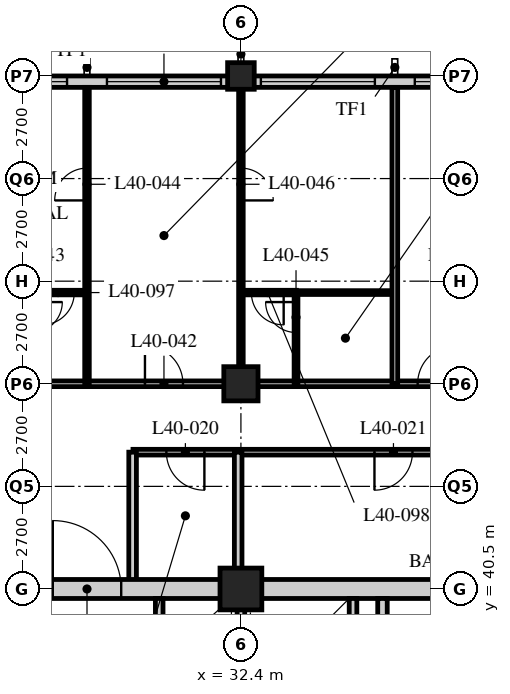
"""IFC4 building model, lengths in metres.
Left out: names, types, materials, properties, quantities, classifications, styles, units other than length and angle.
Written with IfcOpenShell. Run it as: python <this file> out.ifc"""

import sys

from ifc_helpers import new_model, si_unit, direction, frame, frame_2d, origin, origin_2d, place, context, subcontext, project, spatial, rectangle, hollow_rectangle, extrude, element, fill, save


model = new_model("IFC4")
c1 = context("Model", 3, precision=1e-05, world=origin(), true_north=direction((0.0, 1.0)))
c2 = subcontext(c1, "Body", "Model", "MODEL_VIEW")
j1 = project(units=[si_unit("LENGTHUNIT", "METRE"), si_unit("PLANEANGLEUNIT", "RADIAN")], contexts=[c1])
p1 = place(None, origin())
s1 = spatial("IfcSite", under=j1, at=p1, CompositionType="ELEMENT")
p2 = place(p1, origin())
s2 = spatial("IfcBuilding", under=s1, at=p2, CompositionType="ELEMENT")
p3 = place(p2, frame((0.0, 0.0, 154.4)))
s3 = spatial("IfcBuildingStorey", under=s2, at=p3, CompositionType="ELEMENT", Elevation=154.4)
p4 = place(p3, frame((32.4, 40.5, 0.0), z_axis=(0.0, 0.0, 1.0), x_axis=(1.0, 0.0, 0.0)))
e1 = element("IfcColumn", 1, at=p4, inside=s3, PredefinedType="COLUMN", context=c2, shape_type="SweptSolid", body=[
    extrude(hollow_rectangle(XDim=1.1, YDim=1.1, WallThickness=0.1, at=origin_2d()), origin(), (0.0, 0.0, 1.0), 3.4),
])
p5 = place(p3, frame((32.4, 45.9, 0.0), z_axis=(0.0, 0.0, 1.0), x_axis=(1.0, 0.0, 0.0)))
e2 = element("IfcColumn", 2, at=p5, inside=s3, PredefinedType="COLUMN", context=c2, shape_type="SweptSolid", body=[
    extrude(hollow_rectangle(XDim=0.9, YDim=0.9, WallThickness=0.1, at=origin_2d()), origin(), (0.0, 0.0, 1.0), 3.4),
])
p6 = place(p3, frame((32.4, 54.0, 0.0), z_axis=(0.0, 0.0, 1.0), x_axis=(1.0, 0.0, 0.0)))
e3 = element("IfcColumn", 3, at=p6, inside=s3, PredefinedType="COLUMN", context=c2, shape_type="SweptSolid", body=[
    extrude(hollow_rectangle(XDim=0.7, YDim=0.7, WallThickness=0.07, at=origin_2d()), origin(), (0.0, 0.0, 1.0), 3.4),
])
p7 = place(p3, frame((48.3, 53.85, 0.0), z_axis=(0.0, 0.0, 1.0), x_axis=(-1.0, 0.0, 0.0)))
e4 = element("IfcWall", 4, at=p7, inside=s3, PredefinedType="SOLIDWALL", context=c2, shape_type="SweptSolid", body=[
    extrude(rectangle(XDim=40.2, YDim=0.3, at=frame_2d((20.1, 0.0))), origin(), (0.0, 0.0, 1.0), 2.15),
])
p8 = place(p7, frame((0.225, 0.0, 0.9)))
e5 = element("IfcOpeningElement", 5, at=p8, cuts=e4, PredefinedType="OPENING", context=c2, shape_type="SweptSolid", body=[
    extrude(rectangle(XDim=3.0, YDim=1.2, at=frame_2d((1.5, 0.6))), frame((0.0, 0.16, 0.0), z_axis=(0.0, -1.0, 0.0), x_axis=(1.0, 0.0, 0.0)), (0.0, 0.0, 1.0), 0.32),
])
p9 = place(p7, frame((4.275, 0.0, 0.9)))
e6 = element("IfcOpeningElement", 6, at=p9, cuts=e4, PredefinedType="OPENING", context=c2, shape_type="SweptSolid", body=[
    extrude(rectangle(XDim=3.0, YDim=1.2, at=frame_2d((1.5, 0.6))), frame((0.0, 0.16, 0.0), z_axis=(0.0, -1.0, 0.0), x_axis=(1.0, 0.0, 0.0)), (0.0, 0.0, 1.0), 0.32),
])
p10 = place(p7, frame((8.325, 0.0, 0.9)))
e7 = element("IfcOpeningElement", 7, at=p10, cuts=e4, PredefinedType="OPENING", context=c2, shape_type="SweptSolid", body=[
    extrude(rectangle(XDim=3.0, YDim=1.2, at=frame_2d((1.5, 0.6))), frame((0.0, 0.16, 0.0), z_axis=(0.0, -1.0, 0.0), x_axis=(1.0, 0.0, 0.0)), (0.0, 0.0, 1.0), 0.32),
])
p11 = place(p7, frame((12.375, 0.0, 0.9)))
e8 = element("IfcOpeningElement", 8, at=p11, cuts=e4, PredefinedType="OPENING", context=c2, shape_type="SweptSolid", body=[
    extrude(rectangle(XDim=3.0, YDim=1.2, at=frame_2d((1.5, 0.6))), frame((0.0, 0.16, 0.0), z_axis=(0.0, -1.0, 0.0), x_axis=(1.0, 0.0, 0.0)), (0.0, 0.0, 1.0), 0.32),
])
p12 = place(p7, frame((16.425, 0.0, 0.9)))
e9 = element("IfcOpeningElement", 9, at=p12, cuts=e4, PredefinedType="OPENING", context=c2, shape_type="SweptSolid", body=[
    extrude(rectangle(XDim=3.0, YDim=1.2, at=frame_2d((1.5, 0.6))), frame((0.0, 0.16, 0.0), z_axis=(0.0, -1.0, 0.0), x_axis=(1.0, 0.0, 0.0)), (0.0, 0.0, 1.0), 0.32),
])
p13 = place(p7, frame((20.475, 0.0, 0.9)))
e10 = element("IfcOpeningElement", 10, at=p13, cuts=e4, PredefinedType="OPENING", context=c2, shape_type="SweptSolid", body=[
    extrude(rectangle(XDim=3.0, YDim=1.2, at=frame_2d((1.5, 0.6))), frame((0.0, 0.16, 0.0), z_axis=(0.0, -1.0, 0.0), x_axis=(1.0, 0.0, 0.0)), (0.0, 0.0, 1.0), 0.32),
])
p14 = place(p7, frame((24.525, 0.0, 0.9)))
e11 = element("IfcOpeningElement", 11, at=p14, cuts=e4, PredefinedType="OPENING", context=c2, shape_type="SweptSolid", body=[
    extrude(rectangle(XDim=3.0, YDim=1.2, at=frame_2d((1.5, 0.6))), frame((0.0, 0.16, 0.0), z_axis=(0.0, -1.0, 0.0), x_axis=(1.0, 0.0, 0.0)), (0.0, 0.0, 1.0), 0.32),
])
p15 = place(p7, frame((28.575, 0.0, 0.9)))
e12 = element("IfcOpeningElement", 12, at=p15, cuts=e4, PredefinedType="OPENING", context=c2, shape_type="SweptSolid", body=[
    extrude(rectangle(XDim=3.0, YDim=1.2, at=frame_2d((1.5, 0.6))), frame((0.0, 0.16, 0.0), z_axis=(0.0, -1.0, 0.0), x_axis=(1.0, 0.0, 0.0)), (0.0, 0.0, 1.0), 0.32),
])
p16 = place(p7, frame((32.625, 0.0, 0.9)))
e13 = element("IfcOpeningElement", 13, at=p16, cuts=e4, PredefinedType="OPENING", context=c2, shape_type="SweptSolid", body=[
    extrude(rectangle(XDim=3.0, YDim=1.2, at=frame_2d((1.5, 0.6))), frame((0.0, 0.16, 0.0), z_axis=(0.0, -1.0, 0.0), x_axis=(1.0, 0.0, 0.0)), (0.0, 0.0, 1.0), 0.32),
])
p17 = place(p7, frame((36.675, 0.0, 0.9)))
e14 = element("IfcOpeningElement", 14, at=p17, cuts=e4, PredefinedType="OPENING", context=c2, shape_type="SweptSolid", body=[
    extrude(rectangle(XDim=3.0, YDim=1.2, at=frame_2d((1.5, 0.6))), frame((0.0, 0.16, 0.0), z_axis=(0.0, -1.0, 0.0), x_axis=(1.0, 0.0, 0.0)), (0.0, 0.0, 1.0), 0.32),
])
p18 = place(p3, frame((8.1, 45.9, 0.0), z_axis=(0.0, 0.0, 1.0), x_axis=(1.0, 0.0, 0.0)))
e15 = element("IfcWall", 15, at=p18, inside=s3, PredefinedType="PARTITIONING", context=c2, shape_type="SweptSolid", body=[
    extrude(rectangle(XDim=40.5, YDim=0.15, at=frame_2d((20.25, 0.0))), origin(), (0.0, 0.0, 1.0), 2.15),
])
p19 = place(p18, frame((9.625, 0.0, 0.0)))
e16 = element("IfcOpeningElement", 16, at=p19, cuts=e15, PredefinedType="OPENING", context=c2, shape_type="SweptSolid", body=[
    extrude(rectangle(XDim=1.0, YDim=2.1, at=frame_2d((0.5, 1.05))), frame((0.0, 0.085, 0.0), z_axis=(0.0, -1.0, 0.0), x_axis=(1.0, 0.0, 0.0)), (0.0, 0.0, 1.0), 0.17),
])
p20 = place(p18, frame((21.775, 0.0, 0.0)))
e17 = element("IfcOpeningElement", 17, at=p20, cuts=e15, PredefinedType="OPENING", context=c2, shape_type="SweptSolid", body=[
    extrude(rectangle(XDim=1.0, YDim=2.1, at=frame_2d((0.5, 1.05))), frame((0.0, 0.085, 0.0), z_axis=(0.0, -1.0, 0.0), x_axis=(1.0, 0.0, 0.0)), (0.0, 0.0, 1.0), 0.17),
])
p21 = place(p18, frame((28.95, 0.0, 0.0)))
e18 = element("IfcOpeningElement", 18, at=p21, cuts=e15, PredefinedType="OPENING", context=c2, shape_type="SweptSolid", body=[
    extrude(rectangle(XDim=1.0, YDim=2.1, at=frame_2d((0.5, 1.05))), frame((0.0, 0.085, 0.0), z_axis=(0.0, -1.0, 0.0), x_axis=(1.0, 0.0, 0.0)), (0.0, 0.0, 1.0), 0.17),
])
p22 = place(p18, frame((34.85, 0.0, 0.0)))
e19 = element("IfcOpeningElement", 19, at=p22, cuts=e15, PredefinedType="OPENING", context=c2, shape_type="SweptSolid", body=[
    extrude(rectangle(XDim=1.0, YDim=2.1, at=frame_2d((0.5, 1.05))), frame((0.0, 0.085, 0.0), z_axis=(0.0, -1.0, 0.0), x_axis=(1.0, 0.0, 0.0)), (0.0, 0.0, 1.0), 0.17),
])
p23 = place(p18, frame((36.875, 0.0, 0.0)))
e20 = element("IfcOpeningElement", 20, at=p23, cuts=e15, PredefinedType="OPENING", context=c2, shape_type="SweptSolid", body=[
    extrude(rectangle(XDim=1.0, YDim=2.1, at=frame_2d((0.5, 1.05))), frame((0.0, 0.085, 0.0), z_axis=(0.0, -1.0, 0.0), x_axis=(1.0, 0.0, 0.0)), (0.0, 0.0, 1.0), 0.17),
])
p24 = place(p18, frame((2.625, 0.0, 0.0)))
e21 = element("IfcOpeningElement", 21, at=p24, cuts=e15, PredefinedType="OPENING", context=c2, shape_type="SweptSolid", body=[
    extrude(rectangle(XDim=1.0, YDim=2.1, at=frame_2d((0.5, 1.05))), frame((0.0, 0.085, 0.0), z_axis=(0.0, -1.0, 0.0), x_axis=(1.0, 0.0, 0.0)), (0.0, 0.0, 1.0), 0.17),
])
p25 = place(p3, frame((46.8, 44.1, 0.0), z_axis=(0.0, 0.0, 1.0), x_axis=(-1.0, 0.0, 0.0)))
e22 = element("IfcWall", 22, at=p25, inside=s3, PredefinedType="PARTITIONING", context=c2, shape_type="SweptSolid", body=[
    extrude(rectangle(XDim=17.24, YDim=0.15, at=frame_2d((8.62, 0.0))), origin(), (0.0, 0.0, 1.0), 3.15),
])
p26 = place(p25, frame((15.361, 0.0, 0.0)))
e23 = element("IfcOpeningElement", 23, at=p26, cuts=e22, PredefinedType="OPENING", context=c2, shape_type="SweptSolid", body=[
    extrude(rectangle(XDim=1.0, YDim=2.1, at=frame_2d((0.5, 1.05))), frame((0.0, 0.085, 0.0), z_axis=(0.0, -1.0, 0.0), x_axis=(1.0, 0.0, 0.0)), (0.0, 0.0, 1.0), 0.17),
])
p27 = place(p25, frame((9.886, 0.0, 0.0)))
e24 = element("IfcOpeningElement", 24, at=p27, cuts=e22, PredefinedType="OPENING", context=c2, shape_type="SweptSolid", body=[
    extrude(rectangle(XDim=1.0, YDim=2.1, at=frame_2d((0.5, 1.05))), frame((0.0, 0.085, 0.0), z_axis=(0.0, -1.0, 0.0), x_axis=(1.0, 0.0, 0.0)), (0.0, 0.0, 1.0), 0.17),
])
p28 = place(p25, frame((2.65, 0.0, 0.0)))
e25 = element("IfcOpeningElement", 25, at=p28, cuts=e22, PredefinedType="OPENING", context=c2, shape_type="SweptSolid", body=[
    extrude(rectangle(XDim=1.0, YDim=2.1, at=frame_2d((0.5, 1.05))), frame((0.0, 0.085, 0.0), z_axis=(0.0, -1.0, 0.0), x_axis=(1.0, 0.0, 0.0)), (0.0, 0.0, 1.0), 0.17),
])
p29 = place(p3, frame((32.328, 44.1, 0.0), z_axis=(0.0, 0.0, 1.0), x_axis=(0.0, -1.0, 0.0)))
e26 = element("IfcWall", 26, at=p29, inside=s3, PredefinedType="SOLIDWALL", context=c2, shape_type="SweptSolid", body=[
    extrude(rectangle(XDim=3.6, YDim=0.2, at=frame_2d((1.8, 0.0))), origin(), (0.0, 0.0, 1.0), 2.15),
])
p30 = place(p3, frame((29.55, 40.5, 0.0), z_axis=(0.0, 0.0, 1.0), x_axis=(0.0, 1.0, 0.0)))
e27 = element("IfcWall", 27, at=p30, inside=s3, PredefinedType="SOLIDWALL", context=c2, shape_type="SweptSolid", body=[
    extrude(rectangle(XDim=3.6, YDim=0.2, at=frame_2d((1.8, 0.0))), origin(), (0.0, 0.0, 1.0), 3.15),
])
p31 = place(p3, frame((28.35, 45.9, 0.0), z_axis=(0.0, 0.0, 1.0), x_axis=(0.0, 1.0, 0.0)))
e28 = element("IfcWall", 28, at=p31, inside=s3, PredefinedType="PARTITIONING", context=c2, shape_type="SweptSolid", body=[
    extrude(rectangle(XDim=7.8, YDim=0.12, at=frame_2d((3.9, 0.0))), origin(), (0.0, 0.0, 1.0), 3.15),
])
p32 = place(p31, frame((4.825, 0.0, 0.0)))
e29 = element("IfcOpeningElement", 29, at=p32, cuts=e28, PredefinedType="OPENING", context=c2, shape_type="SweptSolid", body=[
    extrude(rectangle(XDim=0.85, YDim=2.1, at=frame_2d((0.425, 1.05))), frame((0.0, 0.07, 0.0), z_axis=(0.0, -1.0, 0.0), x_axis=(1.0, 0.0, 0.0)), (0.0, 0.0, 1.0), 0.14),
])
p33 = place(p3, frame((33.85, 48.3, 0.0), z_axis=(0.0, 0.0, 1.0), x_axis=(1.0, 0.0, 0.0)))
e30 = element("IfcWall", 30, at=p33, inside=s3, PredefinedType="PARTITIONING", context=c2, shape_type="SweptSolid", body=[
    extrude(rectangle(XDim=2.6, YDim=0.1, at=frame_2d((1.3, 0.0))), origin(), (0.0, 0.0, 1.0), 3.15),
])
p34 = place(p3, frame((33.85, 45.9, 0.0), z_axis=(0.0, 0.0, 1.0), x_axis=(0.0, 1.0, 0.0)))
e31 = element("IfcWall", 31, at=p34, inside=s3, PredefinedType="PARTITIONING", context=c2, shape_type="SweptSolid", body=[
    extrude(rectangle(XDim=2.4, YDim=0.1, at=frame_2d((1.2, 0.0))), origin(), (0.0, 0.0, 1.0), 3.15),
])
p35 = place(p34, frame((1.35, 0.0, 0.0)))
e32 = element("IfcOpeningElement", 32, at=p35, cuts=e31, PredefinedType="OPENING", context=c2, shape_type="SweptSolid", body=[
    extrude(rectangle(XDim=0.8, YDim=2.1, at=frame_2d((0.4, 1.05))), frame((0.0, 0.06, 0.0), z_axis=(0.0, -1.0, 0.0), x_axis=(1.0, 0.0, 0.0)), (0.0, 0.0, 1.0), 0.12),
])
p36 = place(p3, frame((32.4, 45.9, 0.0), z_axis=(0.0, 0.0, 1.0), x_axis=(0.0, 1.0, 0.0)))
e33 = element("IfcWall", 33, at=p36, inside=s3, PredefinedType="PARTITIONING", context=c2, shape_type="SweptSolid", body=[
    extrude(rectangle(XDim=7.8, YDim=0.12, at=frame_2d((3.9, 0.0))), origin(), (0.0, 0.0, 1.0), 2.15),
])
p37 = place(p36, frame((4.825, 0.0, 0.0)))
e34 = element("IfcOpeningElement", 34, at=p37, cuts=e33, PredefinedType="OPENING", context=c2, shape_type="SweptSolid", body=[
    extrude(rectangle(XDim=0.85, YDim=2.1, at=frame_2d((0.425, 1.05))), frame((0.0, 0.07, 0.0), z_axis=(0.0, -1.0, 0.0), x_axis=(1.0, 0.0, 0.0)), (0.0, 0.0, 1.0), 0.14),
])
p38 = place(p3, frame((36.45, 45.9, 0.0), z_axis=(0.0, 0.0, 1.0), x_axis=(0.0, 1.0, 0.0)))
e35 = element("IfcWall", 35, at=p38, inside=s3, PredefinedType="PARTITIONING", context=c2, shape_type="SweptSolid", body=[
    extrude(rectangle(XDim=7.8, YDim=0.15, at=frame_2d((3.9, 0.0))), origin(), (0.0, 0.0, 1.0), 3.15),
])
p39 = place(p3, frame((26.89, 48.3, 0.0), z_axis=(0.0, 0.0, 1.0), x_axis=(1.0, 0.0, 0.0)))
e36 = element("IfcWall", 36, at=p39, inside=s3, PredefinedType="PARTITIONING", context=c2, shape_type="SweptSolid", body=[
    extrude(rectangle(XDim=1.46, YDim=0.12, at=frame_2d((0.73, 0.0))), origin(), (0.0, 0.0, 1.0), 3.15),
])
p40 = place(p39, frame((0.275, 0.0, 0.0)))
e37 = element("IfcOpeningElement", 37, at=p40, cuts=e36, PredefinedType="OPENING", context=c2, shape_type="SweptSolid", body=[
    extrude(rectangle(XDim=0.85, YDim=2.1, at=frame_2d((0.425, 1.05))), frame((0.0, 0.07, 0.0), z_axis=(0.0, -1.0, 0.0), x_axis=(1.0, 0.0, 0.0)), (0.0, 0.0, 1.0), 0.14),
])
p41 = place(p3, frame((32.4, 48.3, 0.0), z_axis=(0.0, 0.0, 1.0), x_axis=(1.0, 0.0, 0.0)))
e38 = element("IfcWall", 38, at=p41, inside=s3, PredefinedType="PARTITIONING", context=c2, shape_type="SweptSolid", body=[
    extrude(rectangle(XDim=1.46, YDim=0.12, at=frame_2d((0.73, 0.0))), origin(), (0.0, 0.0, 1.0), 3.15),
])
p42 = place(p41, frame((0.275, 0.0, 0.0)))
e39 = element("IfcOpeningElement", 39, at=p42, cuts=e38, PredefinedType="OPENING", context=c2, shape_type="SweptSolid", body=[
    extrude(rectangle(XDim=0.85, YDim=2.1, at=frame_2d((0.425, 1.05))), frame((0.0, 0.07, 0.0), z_axis=(0.0, -1.0, 0.0), x_axis=(1.0, 0.0, 0.0)), (0.0, 0.0, 1.0), 0.14),
])
p43 = place(p3, frame((24.3, 40.5, 0.0), z_axis=(0.0, 0.0, 1.0), x_axis=(1.0, 0.0, 0.0)))
e40 = element("IfcWall", 40, at=p43, inside=s3, PredefinedType="SOLIDWALL", context=c2, shape_type="SweptSolid", body=[
    extrude(rectangle(XDim=8.1, YDim=0.5, at=frame_2d((4.05, 0.0))), origin(), (0.0, 0.0, 1.0), 2.5),
])
p44 = place(p43, frame((3.15, 0.0, 0.0)))
e41 = element("IfcOpeningElement", 41, at=p44, cuts=e40, PredefinedType="OPENING", context=c2, shape_type="SweptSolid", body=[
    extrude(rectangle(XDim=1.8, YDim=2.4, at=frame_2d((0.9, 1.2))), frame((0.0, 0.26, 0.0), z_axis=(0.0, -1.0, 0.0), x_axis=(1.0, 0.0, 0.0)), (0.0, 0.0, 1.0), 0.52),
])
p45 = place(p3, frame((32.4, 40.5, 0.0), z_axis=(0.0, 0.0, 1.0), x_axis=(1.0, 0.0, 0.0)))
e42 = element("IfcWall", 42, at=p45, inside=s3, PredefinedType="SOLIDWALL", context=c2, shape_type="SweptSolid", body=[
    extrude(rectangle(XDim=8.35, YDim=0.5, at=frame_2d((4.175, 0.0))), origin(), (0.0, 0.0, 1.0), 2.38),
])
p46 = place(p3, frame((32.4, 32.5, 0.0), z_axis=(0.0, 0.0, 1.0), x_axis=(0.0, 1.0, 0.0)))
e43 = element("IfcWall", 43, at=p46, inside=s3, PredefinedType="SOLIDWALL", context=c2, shape_type="SweptSolid", body=[
    extrude(rectangle(XDim=7.75, YDim=0.2, at=frame_2d((3.875, 0.0))), origin(), (0.0, 0.0, 1.0), 2.388),
])
p47 = place(p46, frame((1.9, 0.0, 0.0)))
e44 = element("IfcOpeningElement", 44, at=p47, cuts=e43, PredefinedType="OPENING", context=c2, shape_type="SweptSolid", body=[
    extrude(rectangle(XDim=1.2, YDim=2.1, at=frame_2d((0.6, 1.05))), frame((0.0, 0.11, 0.0), z_axis=(0.0, -1.0, 0.0), x_axis=(1.0, 0.0, 0.0)), (0.0, 0.0, 1.0), 0.22),
])
p48 = place(p3, frame((36.125, 32.5, 0.0), z_axis=(0.0, 0.0, 1.0), x_axis=(0.0, 1.0, 0.0)))
e45 = element("IfcWall", 45, at=p48, inside=s3, PredefinedType="SOLIDWALL", context=c2, shape_type="SweptSolid", body=[
    extrude(rectangle(XDim=7.75, YDim=0.25, at=frame_2d((3.875, 0.0))), origin(), (0.0, 0.0, 1.0), 3.15),
])
p49 = place(p48, frame((0.45, 0.0, 0.0)))
e46 = element("IfcOpeningElement", 46, at=p49, cuts=e45, PredefinedType="OPENING", context=c2, shape_type="SweptSolid", body=[
    extrude(rectangle(XDim=1.2, YDim=2.1, at=frame_2d((0.6, 1.05))), frame((0.0, 0.135, 0.0), z_axis=(0.0, -1.0, 0.0), x_axis=(1.0, 0.0, 0.0)), (0.0, 0.0, 1.0), 0.27),
])
p50 = place(p3, frame((35.35, 37.65, 0.0), z_axis=(0.0, 0.0, 1.0), x_axis=(0.0, 1.0, 0.0)))
e47 = element("IfcWall", 47, at=p50, inside=s3, PredefinedType="SOLIDWALL", context=c2, shape_type="SweptSolid", body=[
    extrude(rectangle(XDim=2.6, YDim=0.2, at=frame_2d((1.3, 0.0))), origin(), (0.0, 0.0, 1.0), 3.15),
])
p51 = place(p3, frame((30.25, 38.65, 0.0), z_axis=(0.0, 0.0, 1.0), x_axis=(0.0, 1.0, 0.0)))
e48 = element("IfcWall", 48, at=p51, inside=s3, PredefinedType="SOLIDWALL", context=c2, shape_type="SweptSolid", body=[
    extrude(rectangle(XDim=1.6, YDim=0.2, at=frame_2d((0.8, 0.0))), origin(), (0.0, 0.0, 1.0), 3.15),
])
p52 = place(p10, origin())
e49 = element("IfcWindow", 49, at=p52, inside=s3, PartitioningType="SINGLE_PANEL", PredefinedType="WINDOW", context=c2, shape_type="SweptSolid", body=[
    extrude(rectangle(XDim=3.0, YDim=1.2, at=frame_2d((1.5, 0.6))), frame((0.0, 0.03, 0.0), z_axis=(0.0, -1.0, 0.0), x_axis=(1.0, 0.0, 0.0)), (0.0, 0.0, 1.0), 0.06),
])
fill(e7, e49)
p53 = place(p11, origin())
e50 = element("IfcWindow", 50, at=p53, inside=s3, PartitioningType="SINGLE_PANEL", PredefinedType="WINDOW", context=c2, shape_type="SweptSolid", body=[
    extrude(rectangle(XDim=3.0, YDim=1.2, at=frame_2d((1.5, 0.6))), frame((0.0, 0.03, 0.0), z_axis=(0.0, -1.0, 0.0), x_axis=(1.0, 0.0, 0.0)), (0.0, 0.0, 1.0), 0.06),
])
fill(e8, e50)
p54 = place(p12, origin())
e51 = element("IfcWindow", 51, at=p54, inside=s3, PartitioningType="SINGLE_PANEL", PredefinedType="WINDOW", context=c2, shape_type="SweptSolid", body=[
    extrude(rectangle(XDim=3.0, YDim=1.2, at=frame_2d((1.5, 0.6))), frame((0.0, 0.03, 0.0), z_axis=(0.0, -1.0, 0.0), x_axis=(1.0, 0.0, 0.0)), (0.0, 0.0, 1.0), 0.06),
])
fill(e9, e51)
p55 = place(p13, origin())
e52 = element("IfcWindow", 52, at=p55, inside=s3, PartitioningType="SINGLE_PANEL", PredefinedType="WINDOW", context=c2, shape_type="SweptSolid", body=[
    extrude(rectangle(XDim=3.0, YDim=1.2, at=frame_2d((1.5, 0.6))), frame((0.0, 0.03, 0.0), z_axis=(0.0, -1.0, 0.0), x_axis=(1.0, 0.0, 0.0)), (0.0, 0.0, 1.0), 0.06),
])
fill(e10, e52)
p56 = place(p26, origin())
e53 = element("IfcDoor", 53, at=p56, inside=s3, OperationType="SINGLE_SWING_LEFT", PredefinedType="DOOR", context=c2, shape_type="SweptSolid", body=[
    extrude(rectangle(XDim=1.0, YDim=2.1, at=frame_2d((0.5, 1.05))), frame((0.0, 0.025, 0.0), z_axis=(0.0, -1.0, 0.0), x_axis=(1.0, 0.0, 0.0)), (0.0, 0.0, 1.0), 0.05),
])
fill(e23, e53)
p57 = place(p27, origin())
e54 = element("IfcDoor", 54, at=p57, inside=s3, OperationType="SINGLE_SWING_RIGHT", PredefinedType="DOOR", context=c2, shape_type="SweptSolid", body=[
    extrude(rectangle(XDim=1.0, YDim=2.1, at=frame_2d((0.5, 1.05))), frame((0.0, 0.025, 0.0), z_axis=(0.0, -1.0, 0.0), x_axis=(1.0, 0.0, 0.0)), (0.0, 0.0, 1.0), 0.05),
])
fill(e24, e54)
p58 = place(p20, origin())
e55 = element("IfcDoor", 55, at=p58, inside=s3, OperationType="SINGLE_SWING_LEFT", PredefinedType="DOOR", context=c2, shape_type="SweptSolid", body=[
    extrude(rectangle(XDim=1.0, YDim=2.1, at=frame_2d((0.5, 1.05))), frame((0.0, 0.025, 0.0), z_axis=(0.0, -1.0, 0.0), x_axis=(1.0, 0.0, 0.0)), (0.0, 0.0, 1.0), 0.05),
])
fill(e17, e55)
p59 = place(p32, origin())
e56 = element("IfcDoor", 56, at=p59, inside=s3, OperationType="SINGLE_SWING_LEFT", PredefinedType="DOOR", context=c2, shape_type="SweptSolid", body=[
    extrude(rectangle(XDim=0.85, YDim=2.1, at=frame_2d((0.425, 1.05))), frame((0.0, 0.025, 0.0), z_axis=(0.0, -1.0, 0.0), x_axis=(1.0, 0.0, 0.0)), (0.0, 0.0, 1.0), 0.05),
])
fill(e29, e56)
p60 = place(p35, origin())
e57 = element("IfcDoor", 57, at=p60, inside=s3, OperationType="SINGLE_SWING_RIGHT", PredefinedType="DOOR", context=c2, shape_type="SweptSolid", body=[
    extrude(rectangle(XDim=0.8, YDim=2.1, at=frame_2d((0.4, 1.05))), frame((0.0, 0.025, 0.0), z_axis=(0.0, -1.0, 0.0), x_axis=(1.0, 0.0, 0.0)), (0.0, 0.0, 1.0), 0.05),
])
fill(e32, e57)
p61 = place(p37, origin())
e58 = element("IfcDoor", 58, at=p61, inside=s3, OperationType="SINGLE_SWING_RIGHT", PredefinedType="DOOR", context=c2, shape_type="SweptSolid", body=[
    extrude(rectangle(XDim=0.85, YDim=2.1, at=frame_2d((0.425, 1.05))), frame((0.0, 0.025, 0.0), z_axis=(0.0, -1.0, 0.0), x_axis=(1.0, 0.0, 0.0)), (0.0, 0.0, 1.0), 0.05),
])
fill(e34, e58)
p62 = place(p21, origin())
e59 = element("IfcDoor", 59, at=p62, inside=s3, OperationType="SINGLE_SWING_RIGHT", PredefinedType="DOOR", context=c2, shape_type="SweptSolid", body=[
    extrude(rectangle(XDim=1.0, YDim=2.1, at=frame_2d((0.5, 1.05))), frame((0.0, 0.025, 0.0), z_axis=(0.0, -1.0, 0.0), x_axis=(1.0, 0.0, 0.0)), (0.0, 0.0, 1.0), 0.05),
])
fill(e18, e59)
p63 = place(p40, origin())
e60 = element("IfcDoor", 60, at=p63, inside=s3, OperationType="SINGLE_SWING_RIGHT", PredefinedType="DOOR", context=c2, shape_type="SweptSolid", body=[
    extrude(rectangle(XDim=0.85, YDim=2.1, at=frame_2d((0.425, 1.05))), frame((0.0, 0.025, 0.0), z_axis=(0.0, -1.0, 0.0), x_axis=(1.0, 0.0, 0.0)), (0.0, 0.0, 1.0), 0.05),
])
fill(e37, e60)
p64 = place(p42, origin())
e61 = element("IfcDoor", 61, at=p64, inside=s3, OperationType="SINGLE_SWING_LEFT", PredefinedType="DOOR", context=c2, shape_type="SweptSolid", body=[
    extrude(rectangle(XDim=0.85, YDim=2.1, at=frame_2d((0.425, 1.05))), frame((0.0, 0.025, 0.0), z_axis=(0.0, -1.0, 0.0), x_axis=(1.0, 0.0, 0.0)), (0.0, 0.0, 1.0), 0.05),
])
fill(e39, e61)
p65 = place(p44, origin())
e62 = element("IfcDoor", 62, at=p65, inside=s3, OperationType="DOUBLE_DOOR_SINGLE_SWING", PredefinedType="DOOR", context=c2, shape_type="SweptSolid", body=[
    extrude(rectangle(XDim=1.8, YDim=2.4, at=frame_2d((0.9, 1.2))), frame((0.0, 0.025, 0.0), z_axis=(0.0, -1.0, 0.0), x_axis=(1.0, 0.0, 0.0)), (0.0, 0.0, 1.0), 0.05),
])
fill(e41, e62)
save(model, sys.argv[1])
